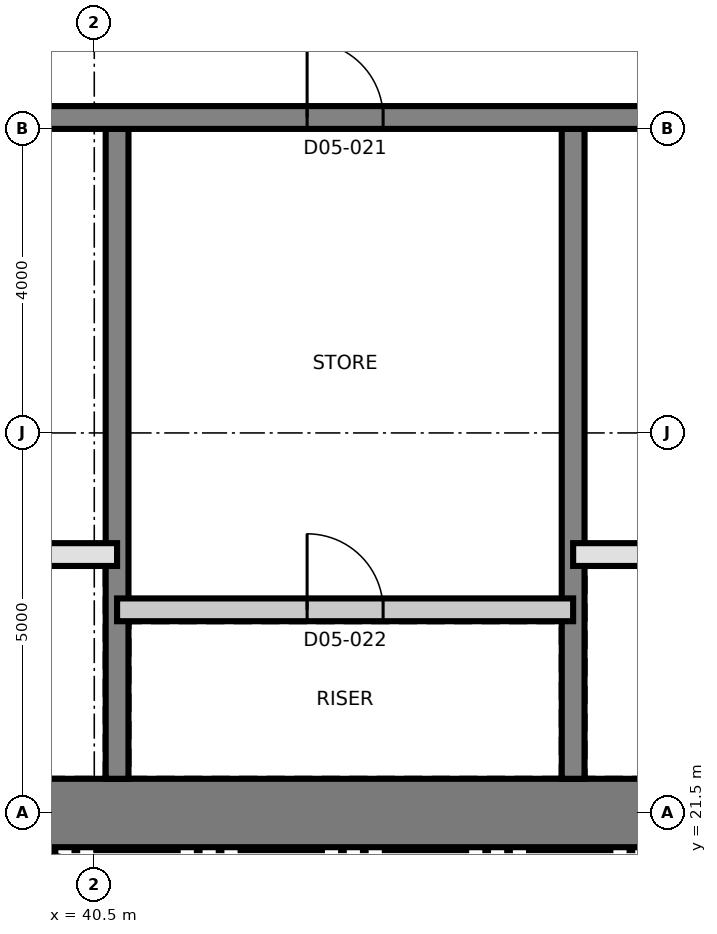
"""IFC4 building model, lengths in metres.
Left out: names, types, materials, properties, quantities, classifications, styles, units other than length and angle.
Written with IfcOpenShell. Run it as: python <this file> out.ifc"""

import sys

from ifc_helpers import new_model, si_unit, direction, frame, frame_2d, origin, place, context, subcontext, project, spatial, rectangle, extrude, element, fill, save


model = new_model("IFC4")
c1 = context("Model", 3, precision=1e-05, world=origin(), true_north=direction((0.0, 1.0)))
c2 = subcontext(c1, "Body", "Model", "MODEL_VIEW")
j1 = project(units=[si_unit("LENGTHUNIT", "METRE"), si_unit("PLANEANGLEUNIT", "RADIAN")], contexts=[c1])
p1 = place(None, origin())
s1 = spatial("IfcSite", under=j1, at=p1, CompositionType="ELEMENT")
p2 = place(p1, origin())
s2 = spatial("IfcBuilding", under=s1, at=p2, CompositionType="ELEMENT")
p3 = place(p2, frame((0.0, 0.0, 77.9)))
s3 = spatial("IfcBuildingStorey", under=s2, at=p3, CompositionType="ELEMENT", Elevation=77.9)
p4 = place(p3, frame((31.05, 21.5, 0.0), z_axis=(0.0, 0.0, 1.0), x_axis=(1.0, 0.0, 0.0)))
e1 = element("IfcWall", 1, at=p4, inside=s3, PredefinedType="SHEAR", context=c2, shape_type="SweptSolid", body=[
    extrude(rectangle(XDim=27.0, YDim=0.9, at=frame_2d((13.5, 0.0))), origin(), (0.0, 0.0, 1.0), 3.7),
])
for number, where, z_axis, x_axis in (
    (2, (40.8, 21.95, 0.0), (0.0, 0.0, 1.0), (0.0, 1.0, 0.0)),
    (3, (46.8, 21.95, 0.0), (0.0, 0.0, 1.0), (0.0, 1.0, 0.0)),
):
    element("IfcWall", number, at=place(p3, frame(where, z_axis=z_axis, x_axis=x_axis)), inside=s3, PredefinedType="SHEAR", context=c2, shape_type="SweptSolid", body=[
        extrude(rectangle(XDim=8.55, YDim=0.3, at=frame_2d((4.275, 0.0))), origin(), (0.0, 0.0, 1.0), 3.7),
    ])
p5 = place(p3, frame((31.95, 30.65, 0.0), z_axis=(0.0, 0.0, 1.0), x_axis=(1.0, 0.0, 0.0)))
e4 = element("IfcWall", 4, at=p5, inside=s3, PredefinedType="SHEAR", context=c2, shape_type="SweptSolid", body=[
    extrude(rectangle(XDim=26.1, YDim=0.3, at=frame_2d((13.05, 0.0))), origin(), (0.0, 0.0, 1.0), 3.7),
])
p6 = place(p5, frame((24.55, 0.0, 0.0)))
e5 = element("IfcOpeningElement", 5, at=p6, cuts=e4, PredefinedType="OPENING", context=c2, shape_type="SweptSolid", body=[
    extrude(rectangle(XDim=1.0, YDim=2.1, at=frame_2d((0.5, 1.05))), frame((0.0, 0.16, 0.0), z_axis=(0.0, -1.0, 0.0), x_axis=(1.0, 0.0, 0.0)), (0.0, 0.0, 1.0), 0.32),
])
p7 = place(p5, frame((11.35, 0.0, 0.0)))
e6 = element("IfcOpeningElement", 6, at=p7, cuts=e4, PredefinedType="OPENING", context=c2, shape_type="SweptSolid", body=[
    extrude(rectangle(XDim=1.0, YDim=2.1, at=frame_2d((0.5, 1.05))), frame((0.0, 0.16, 0.0), z_axis=(0.0, -1.0, 0.0), x_axis=(1.0, 0.0, 0.0)), (0.0, 0.0, 1.0), 0.32),
])
p8 = place(p3, frame((39.735, 20.846, 0.0), z_axis=(0.0, 0.0, 1.0), x_axis=(0.97206095595, -0.234728562212, 0.0)))
e7 = element("IfcWall", 7, at=p8, inside=s3, PredefinedType="SOLIDWALL", context=c2, shape_type="SweptSolid", body=[
    extrude(rectangle(XDim=2.35, YDim=0.3, at=frame_2d((1.175, 0.0))), origin(), (0.0, 0.0, 1.0), 3.4),
])
p9 = place(p3, frame((40.8, 24.173, 0.0), z_axis=(0.0, 0.0, 1.0), x_axis=(1.0, 0.0, 0.0)))
e8 = element("IfcWall", 8, at=p9, inside=s3, PredefinedType="PARTITIONING", context=c2, shape_type="SweptSolid", body=[
    extrude(rectangle(XDim=6.0, YDim=0.3, at=frame_2d((3.0, 0.0))), origin(), (0.0, 0.0, 1.0), 3.4),
])
p10 = place(p9, frame((2.5, 0.0, 0.0)))
e9 = element("IfcOpeningElement", 9, at=p10, cuts=e8, PredefinedType="OPENING", context=c2, shape_type="SweptSolid", body=[
    extrude(rectangle(XDim=1.0, YDim=2.1, at=frame_2d((0.5, 1.05))), frame((0.0, 0.16, 0.0), z_axis=(0.0, -1.0, 0.0), x_axis=(1.0, 0.0, 0.0)), (0.0, 0.0, 1.0), 0.32),
])
p11 = place(p3, frame((31.8, 24.9, 0.0), z_axis=(0.0, 0.0, 1.0), x_axis=(1.0, 0.0, 0.0)))
e10 = element("IfcWall", 10, at=p11, inside=s3, PredefinedType="SOLIDWALL", context=c2, shape_type="SweptSolid", body=[
    extrude(rectangle(XDim=9.0, YDim=0.3, at=frame_2d((4.5, 0.0))), origin(), (0.0, 0.0, 1.0), 3.4),
])
p12 = place(p11, frame((7.05, 0.0, 0.0)))
e11 = element("IfcOpeningElement", 11, at=p12, cuts=e10, PredefinedType="OPENING", context=c2, shape_type="SweptSolid", body=[
    extrude(rectangle(XDim=0.9, YDim=2.1, at=frame_2d((0.45, 1.05))), frame((0.0, 0.16, 0.0), z_axis=(0.0, -1.0, 0.0), x_axis=(1.0, 0.0, 0.0)), (0.0, 0.0, 1.0), 0.32),
])
p13 = place(p11, frame((0.95, 0.0, 0.0)))
e12 = element("IfcOpeningElement", 12, at=p13, cuts=e10, PredefinedType="OPENING", context=c2, shape_type="SweptSolid", body=[
    extrude(rectangle(XDim=1.1, YDim=2.4, at=frame_2d((0.55, 1.2))), frame((0.0, 0.16, 0.0), z_axis=(0.0, -1.0, 0.0), x_axis=(1.0, 0.0, 0.0)), (0.0, 0.0, 1.0), 0.32),
])
p14 = place(p11, frame((3.95, 0.0, 0.0)))
e13 = element("IfcOpeningElement", 13, at=p14, cuts=e10, PredefinedType="OPENING", context=c2, shape_type="SweptSolid", body=[
    extrude(rectangle(XDim=1.1, YDim=2.4, at=frame_2d((0.55, 1.2))), frame((0.0, 0.16, 0.0), z_axis=(0.0, -1.0, 0.0), x_axis=(1.0, 0.0, 0.0)), (0.0, 0.0, 1.0), 0.32),
])
p15 = place(p3, frame((46.8, 24.9, 0.0), z_axis=(0.0, 0.0, 1.0), x_axis=(1.0, 0.0, 0.0)))
e14 = element("IfcWall", 14, at=p15, inside=s3, PredefinedType="SOLIDWALL", context=c2, shape_type="SweptSolid", body=[
    extrude(rectangle(XDim=9.0, YDim=0.3, at=frame_2d((4.5, 0.0))), origin(), (0.0, 0.0, 1.0), 3.4),
])
p16 = place(p15, frame((1.05, 0.0, 0.0)))
e15 = element("IfcOpeningElement", 15, at=p16, cuts=e14, PredefinedType="OPENING", context=c2, shape_type="SweptSolid", body=[
    extrude(rectangle(XDim=0.9, YDim=2.1, at=frame_2d((0.45, 1.05))), frame((0.0, 0.16, 0.0), z_axis=(0.0, -1.0, 0.0), x_axis=(1.0, 0.0, 0.0)), (0.0, 0.0, 1.0), 0.32),
])
p17 = place(p7, origin())
e16 = element("IfcDoor", 16, at=p17, inside=s3, OperationType="SINGLE_SWING_LEFT", PredefinedType="DOOR", context=c2, shape_type="SweptSolid", body=[
    extrude(rectangle(XDim=1.0, YDim=2.1, at=frame_2d((0.5, 1.05))), frame((0.0, 0.025, 0.0), z_axis=(0.0, -1.0, 0.0), x_axis=(1.0, 0.0, 0.0)), (0.0, 0.0, 1.0), 0.05),
])
fill(e6, e16)
p18 = place(p10, origin())
e17 = element("IfcDoor", 17, at=p18, inside=s3, OperationType="SINGLE_SWING_RIGHT", PredefinedType="DOOR", context=c2, shape_type="SweptSolid", body=[
    extrude(rectangle(XDim=1.0, YDim=2.1, at=frame_2d((0.5, 1.05))), frame((0.0, 0.025, 0.0), z_axis=(0.0, -1.0, 0.0), x_axis=(1.0, 0.0, 0.0)), (0.0, 0.0, 1.0), 0.05),
])
fill(e9, e17)
save(model, sys.argv[1])
